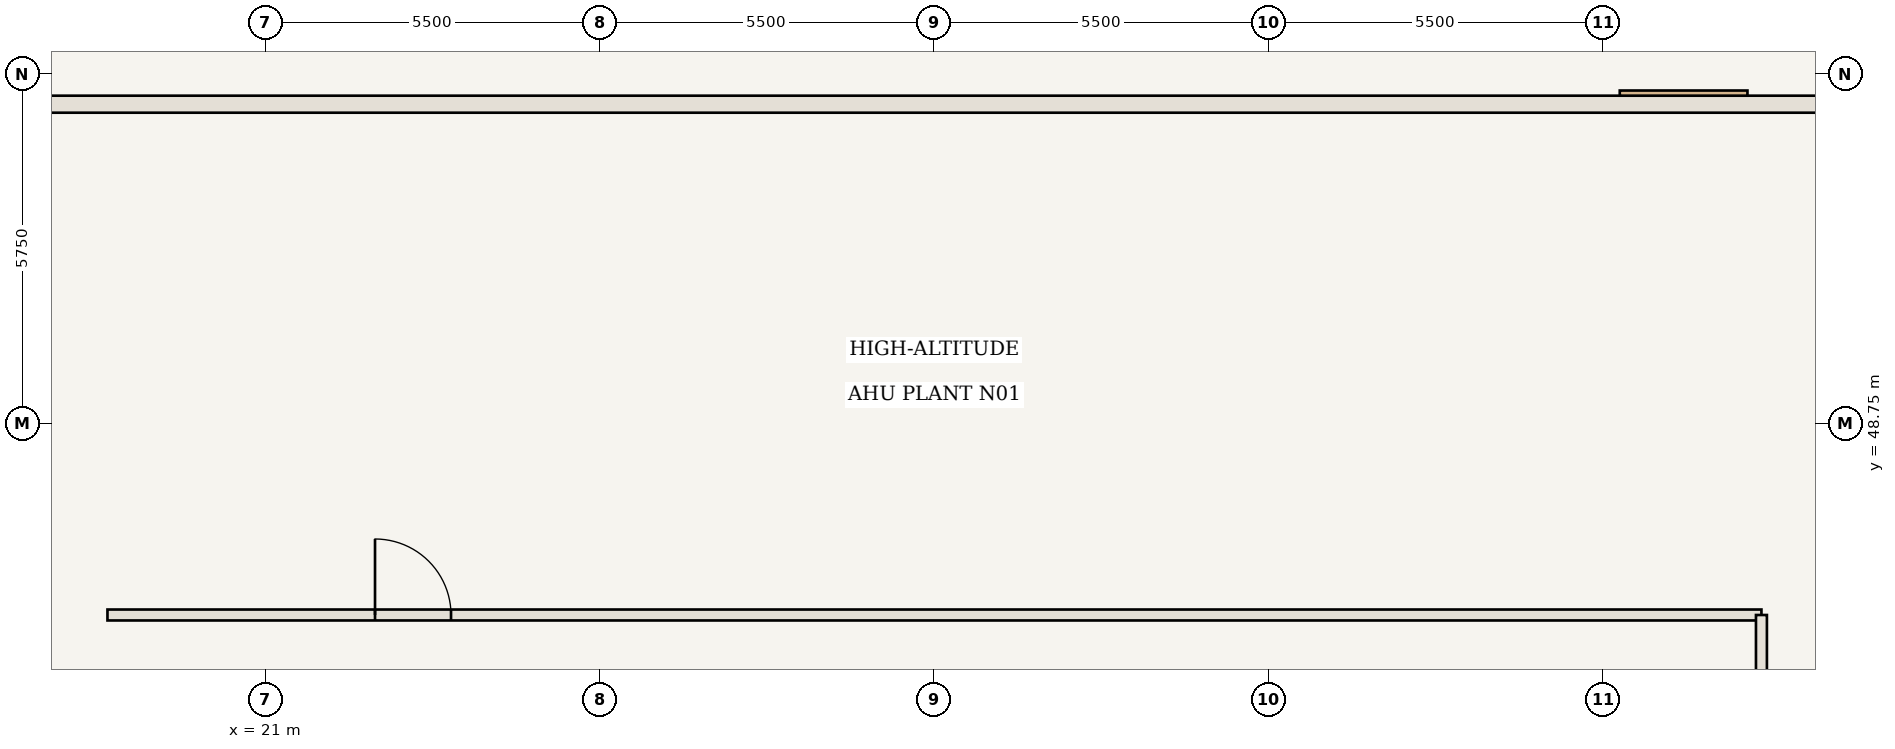
"""IFC4 building model, lengths in metres.
Left out: names, types, materials, properties, quantities, classifications, styles, units other than length and angle.
Written with IfcOpenShell. Run it as: python <this file> out.ifc"""

import sys

from ifc_helpers import new_model, si_unit, direction, frame, frame_2d, origin, place, context, subcontext, project, spatial, rectangle, extrude, element, fill, save


model = new_model("IFC4")
c1 = context("Model", 3, precision=1e-05, world=origin(), true_north=direction((0.0, 1.0)))
c2 = subcontext(c1, "Body", "Model", "MODEL_VIEW")
j1 = project(units=[si_unit("LENGTHUNIT", "METRE"), si_unit("PLANEANGLEUNIT", "RADIAN")], contexts=[c1])
p1 = place(None, origin())
s1 = spatial("IfcSite", under=j1, at=p1, CompositionType="ELEMENT")
p2 = place(p1, origin())
s2 = spatial("IfcBuilding", under=s1, at=p2, CompositionType="ELEMENT")
p3 = place(p2, frame((0.0, 0.0, 176.05)))
s3 = spatial("IfcBuildingStorey", under=s2, at=p3, CompositionType="ELEMENT", Elevation=176.05)
p4 = place(p3, frame((18.4, 45.6, 0.0), z_axis=(0.0, 0.0, 1.0), x_axis=(1.0, 0.0, 0.0)))
e1 = element("IfcWall", 1, at=p4, inside=s3, PredefinedType="STANDARD", context=c2, shape_type="SweptSolid", body=[
    extrude(rectangle(XDim=27.2, YDim=0.18, at=frame_2d((13.6, 0.0))), origin(), (0.0, 0.0, 1.0), 5.88),
])
p5 = place(p4, frame((4.4, 0.0, 0.0)))
e2 = element("IfcOpeningElement", 2, at=p5, cuts=e1, PredefinedType="OPENING", context=c2, shape_type="SweptSolid", body=[
    extrude(rectangle(XDim=1.25, YDim=2.2, at=frame_2d((0.625, 1.1))), frame((0.0, 0.1, 0.0), z_axis=(0.0, -1.0, 0.0), x_axis=(1.0, 0.0, 0.0)), (0.0, 0.0, 1.0), 0.2),
])
p6 = place(p3, frame((45.6, 18.4, 0.0), z_axis=(0.0, 0.0, 1.0), x_axis=(0.0, 1.0, 0.0)))
e3 = element("IfcWall", 3, at=p6, inside=s3, PredefinedType="STANDARD", context=c2, shape_type="SweptSolid", body=[
    extrude(rectangle(XDim=27.2, YDim=0.18, at=frame_2d((13.6, 0.0))), origin(), (0.0, 0.0, 1.0), 5.88),
])
p7 = place(p6, frame((14.55, 0.0, 0.0)))
e4 = element("IfcOpeningElement", 4, at=p7, cuts=e3, PredefinedType="OPENING", context=c2, shape_type="SweptSolid", body=[
    extrude(rectangle(XDim=1.25, YDim=2.2, at=frame_2d((0.625, 1.1))), frame((0.0, 0.1, 0.0), z_axis=(0.0, -1.0, 0.0), x_axis=(1.0, 0.0, 0.0)), (0.0, 0.0, 1.0), 0.2),
])
p8 = place(p3, frame((10.0, 54.0, 0.0), z_axis=(0.0, 0.0, 1.0), x_axis=(1.0, 0.0, 0.0)))
e5 = element("IfcWall", 5, at=p8, inside=s3, PredefinedType="USERDEFINED", context=c2, shape_type="SweptSolid", body=[
    extrude(rectangle(XDim=44.0, YDim=0.28, at=frame_2d((22.0, 0.0))), origin(), (0.0, 0.0, 1.0), 3.88),
])
p9 = place(p5, origin())
e6 = element("IfcDoor", 6, at=p9, inside=s3, OperationType="SINGLE_SWING_LEFT", PredefinedType="DOOR", context=c2, shape_type="SweptSolid", body=[
    extrude(rectangle(XDim=1.25, YDim=2.2, at=frame_2d((0.625, 1.1))), frame((0.0, 0.025, 0.0), z_axis=(0.0, -1.0, 0.0), x_axis=(1.0, 0.0, 0.0)), (0.0, 0.0, 1.0), 0.05),
])
fill(e2, e6)
save(model, sys.argv[1])
